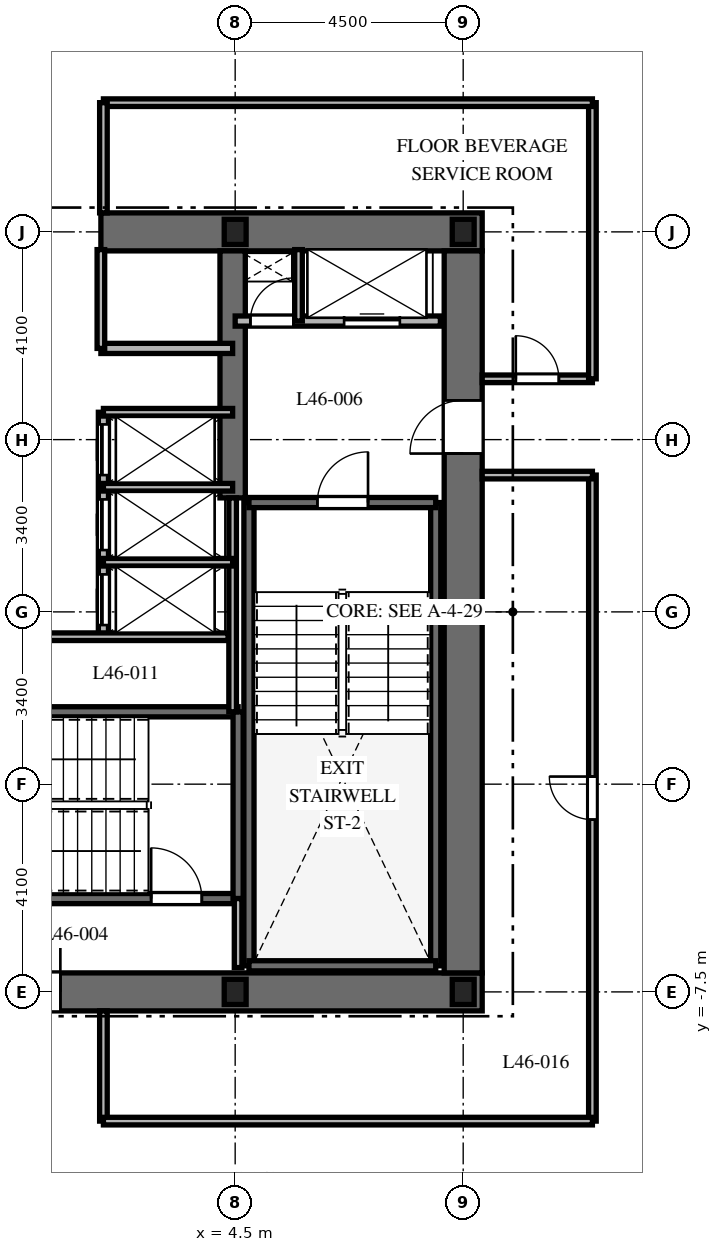
"""IFC4 building model, lengths in metres.
Left out: names, types, materials, properties, quantities, classifications, styles, units other than length and angle.
Written with IfcOpenShell. Run it as: python <this file> out.ifc"""

import sys

from ifc_helpers import new_model, si_unit, direction, frame, frame_2d, origin, origin_2d, place, context, subcontext, project, spatial, rectangle, i_section, extrude, element, fill, save


model = new_model("IFC4")
c1 = context("Model", 3, precision=1e-05, world=origin(), true_north=direction((0.0, 1.0)))
c2 = subcontext(c1, "Body", "Model", "MODEL_VIEW")
j1 = project(units=[si_unit("LENGTHUNIT", "METRE"), si_unit("PLANEANGLEUNIT", "RADIAN")], contexts=[c1])
p1 = place(None, origin())
s1 = spatial("IfcSite", under=j1, at=p1, CompositionType="ELEMENT")
p2 = place(p1, origin())
s2 = spatial("IfcBuilding", under=s1, at=p2, CompositionType="ELEMENT")
p3 = place(p2, frame((0.0, 0.0, 186.7)))
s3 = spatial("IfcBuildingStorey", under=s2, at=p3, CompositionType="ELEMENT", Elevation=186.7)
p4 = place(p3, frame((-9.375, -7.5, 0.0), z_axis=(0.0, 0.0, 1.0), x_axis=(1.0, 0.0, 0.0)))
e1 = element("IfcWall", 1, at=p4, inside=s3, PredefinedType="SHEAR", context=c2, shape_type="SweptSolid", body=[
    extrude(rectangle(XDim=18.75, YDim=0.75, at=frame_2d((9.375, 0.0))), origin(), (0.0, 0.0, 1.0), 3.7),
])
p5 = place(p4, frame((9.425, 0.0, 0.0)))
e2 = element("IfcOpeningElement", 2, at=p5, cuts=e1, PredefinedType="OPENING", context=c2, shape_type="SweptSolid", body=[
    extrude(rectangle(XDim=1.0, YDim=2.15, at=frame_2d((0.5, 1.075))), frame((0.0, 0.385, 0.0), z_axis=(0.0, -1.0, 0.0), x_axis=(1.0, 0.0, 0.0)), (0.0, 0.0, 1.0), 0.77),
])
p6 = place(p3, frame((1.85, 7.5, 0.0), z_axis=(0.0, 0.0, 1.0), x_axis=(1.0, 0.0, 0.0)))
e3 = element("IfcWall", 3, at=p6, inside=s3, PredefinedType="SHEAR", context=c2, shape_type="SweptSolid", body=[
    extrude(rectangle(XDim=7.525, YDim=0.75, at=frame_2d((3.762, 0.0))), origin(), (0.0, 0.0, 1.0), 3.7),
])
p7 = place(p3, frame((9.0, -7.125, 0.0), z_axis=(0.0, 0.0, 1.0), x_axis=(0.0, 1.0, 0.0)))
e4 = element("IfcWall", 4, at=p7, inside=s3, PredefinedType="SHEAR", context=c2, shape_type="SweptSolid", body=[
    extrude(rectangle(XDim=14.25, YDim=0.75, at=frame_2d((7.125, 0.0))), origin(), (0.0, 0.0, 1.0), 3.7),
])
p8 = place(p7, frame((10.25, 0.0, 0.0)))
e5 = element("IfcOpeningElement", 5, at=p8, cuts=e4, PredefinedType="OPENING", context=c2, shape_type="SweptSolid", body=[
    extrude(rectangle(XDim=1.05, YDim=2.15, at=frame_2d((0.525, 1.075))), frame((0.0, 0.385, 0.0), z_axis=(0.0, -1.0, 0.0), x_axis=(1.0, 0.0, 0.0)), (0.0, 0.0, 1.0), 0.77),
])
p9 = place(p3, frame((4.45, 2.25, 0.0), z_axis=(0.0, 0.0, 1.0), x_axis=(0.0, 1.0, 0.0)))
e6 = element("IfcWall", 6, at=p9, inside=s3, PredefinedType="SHEAR", context=c2, shape_type="SweptSolid", body=[
    extrude(rectangle(XDim=4.875, YDim=0.5, at=frame_2d((2.438, 0.0))), origin(), (0.0, 0.0, 1.0), 3.7),
])
for number, where, z_axis, x_axis in (
    (7, (4.772, -6.985, 0.0), (0.0, 0.0, 1.0), (0.0, 1.0, 0.0)),
    (8, (8.458, -6.985, 0.0), (0.0, 0.0, 1.0), (0.0, 1.0, 0.0)),
):
    element("IfcWall", number, at=place(p3, frame(where, z_axis=z_axis, x_axis=x_axis)), inside=s3, PredefinedType="SHEAR", context=c2, shape_type="SweptSolid", body=[
        extrude(rectangle(XDim=9.143, YDim=0.2, at=frame_2d((4.572, 0.0))), origin(), (0.0, 0.0, 1.0), 3.7),
    ])
p10 = place(p3, frame((4.772, -6.985, 0.0), z_axis=(0.0, 0.0, 1.0), x_axis=(1.0, 0.0, 0.0)))
e9 = element("IfcWall", 9, at=p10, inside=s3, PredefinedType="SHEAR", context=c2, shape_type="SweptSolid", body=[
    extrude(rectangle(XDim=3.686, YDim=0.2, at=frame_2d((1.843, 0.0))), origin(), (0.0, 0.0, 1.0), 3.7),
])
p11 = place(p3, frame((4.772, 2.158, 0.0), z_axis=(0.0, 0.0, 1.0), x_axis=(1.0, 0.0, 0.0)))
e10 = element("IfcWall", 10, at=p11, inside=s3, PredefinedType="SHEAR", context=c2, shape_type="SweptSolid", body=[
    extrude(rectangle(XDim=3.686, YDim=0.2, at=frame_2d((1.843, 0.0))), origin(), (0.0, 0.0, 1.0), 3.7),
])
p12 = place(p11, frame((1.35, 0.0, 0.0)))
e11 = element("IfcOpeningElement", 11, at=p12, cuts=e10, PredefinedType="OPENING", context=c2, shape_type="SweptSolid", body=[
    extrude(rectangle(XDim=1.0, YDim=2.15, at=frame_2d((0.5, 1.075))), frame((0.0, 0.11, 0.0), z_axis=(0.0, -1.0, 0.0), x_axis=(1.0, 0.0, 0.0)), (0.0, 0.0, 1.0), 0.22),
])
p13 = place(p3, frame((-4.608, -5.658, 0.0), z_axis=(0.0, 0.0, 1.0), x_axis=(1.0, 0.0, 0.0)))
e12 = element("IfcWall", 12, at=p13, inside=s3, PredefinedType="SHEAR", context=c2, shape_type="SweptSolid", body=[
    extrude(rectangle(XDim=9.166, YDim=0.2, at=frame_2d((4.583, 0.0))), origin(), (0.0, 0.0, 1.0), 3.7),
])
p14 = place(p13, frame((7.45, 0.0, 0.0)))
e13 = element("IfcOpeningElement", 13, at=p14, cuts=e12, PredefinedType="OPENING", context=c2, shape_type="SweptSolid", body=[
    extrude(rectangle(XDim=1.0, YDim=2.15, at=frame_2d((0.5, 1.075))), frame((0.0, 0.11, 0.0), z_axis=(0.0, -1.0, 0.0), x_axis=(1.0, 0.0, 0.0)), (0.0, 0.0, 1.0), 0.22),
])
p15 = place(p3, frame((-4.608, -1.972, 0.0), z_axis=(0.0, 0.0, 1.0), x_axis=(1.0, 0.0, 0.0)))
e14 = element("IfcWall", 14, at=p15, inside=s3, PredefinedType="SHEAR", context=c2, shape_type="SweptSolid", body=[
    extrude(rectangle(XDim=9.166, YDim=0.2, at=frame_2d((4.583, 0.0))), origin(), (0.0, 0.0, 1.0), 3.7),
])
p16 = place(p3, frame((4.558, -5.658, 0.0), z_axis=(0.0, 0.0, 1.0), x_axis=(0.0, 1.0, 0.0)))
e15 = element("IfcWall", 15, at=p16, inside=s3, PredefinedType="SHEAR", context=c2, shape_type="SweptSolid", body=[
    extrude(rectangle(XDim=3.686, YDim=0.2, at=frame_2d((1.843, 0.0))), origin(), (0.0, 0.0, 1.0), 3.7),
])
for number, where, z_axis, x_axis in (
    (16, (4.5, -7.5, 0.0), (0.0, 0.0, 1.0), (1.0, 0.0, 0.0)),
    (17, (9.0, -7.5, 0.0), (0.0, 0.0, 1.0), (1.0, 0.0, 0.0)),
    (18, (9.0, 7.5, 0.0), (0.0, 0.0, 1.0), (1.0, 0.0, 0.0)),
    (19, (4.5, 7.5, 0.0), (0.0, 0.0, 1.0), (1.0, 0.0, 0.0)),
):
    element("IfcColumn", number, at=place(p3, frame(where, z_axis=z_axis, x_axis=x_axis)), inside=s3, PredefinedType="COLUMN", context=c2, shape_type="SweptSolid", body=[
        extrude(i_section(OverallWidth=0.432, OverallDepth=0.498, WebThickness=0.056, FlangeThickness=0.089, at=origin_2d()), origin(), (0.0, 0.0, 1.0), 3.7),
    ])
p17 = place(p3, frame((4.558, -7.02, 0.0), z_axis=(0.0, 0.0, 1.0), x_axis=(0.0, 1.0, 0.0)))
e20 = element("IfcWall", 20, at=p17, inside=s3, PredefinedType="PARTITIONING", context=c2, shape_type="SweptSolid", body=[
    extrude(rectangle(XDim=1.362, YDim=0.15, at=frame_2d((0.681, 0.0))), origin(), (0.0, 0.0, 1.0), 3.4),
])
p18 = place(p3, frame((4.5, 5.74, 0.0), z_axis=(0.0, 0.0, 1.0), x_axis=(1.0, 0.0, 0.0)))
e21 = element("IfcWall", 21, at=p18, inside=s3, PredefinedType="PARTITIONING", context=c2, shape_type="SweptSolid", body=[
    extrude(rectangle(XDim=4.05, YDim=0.2, at=frame_2d((2.025, 0.0))), origin(), (0.0, 0.0, 1.0), 3.4),
])
p19 = place(p18, frame((0.3, 0.0, 0.0)))
e22 = element("IfcOpeningElement", 22, at=p19, cuts=e21, PredefinedType="OPENING", context=c2, shape_type="SweptSolid", body=[
    extrude(rectangle(XDim=0.85, YDim=2.03, at=frame_2d((0.425, 1.015))), frame((0.0, 0.11, 0.0), z_axis=(0.0, -1.0, 0.0), x_axis=(1.0, 0.0, 0.0)), (0.0, 0.0, 1.0), 0.22),
])
p20 = place(p18, frame((2.15, 0.0, 0.0)))
e23 = element("IfcOpeningElement", 23, at=p20, cuts=e21, PredefinedType="OPENING", context=c2, shape_type="SweptSolid", body=[
    extrude(rectangle(XDim=1.1, YDim=2.2, at=frame_2d((0.55, 1.1))), frame((0.0, 0.11, 0.0), z_axis=(0.0, -1.0, 0.0), x_axis=(1.0, 0.0, 0.0)), (0.0, 0.0, 1.0), 0.22),
])
p21 = place(p3, frame((5.75, 5.74, 0.0), z_axis=(0.0, 0.0, 1.0), x_axis=(0.0, 1.0, 0.0)))
e24 = element("IfcWall", 24, at=p21, inside=s3, PredefinedType="PARTITIONING", context=c2, shape_type="SweptSolid", body=[
    extrude(rectangle(XDim=1.41, YDim=0.15, at=frame_2d((0.705, 0.0))), origin(), (0.0, 0.0, 1.0), 3.4),
])
p22 = place(p3, frame((1.85, 5.2, 0.0), z_axis=(0.0, 0.0, 1.0), x_axis=(1.0, 0.0, 0.0)))
e25 = element("IfcWall", 25, at=p22, inside=s3, PredefinedType="PARTITIONING", context=c2, shape_type="SweptSolid", body=[
    extrude(rectangle(XDim=2.6, YDim=0.2, at=frame_2d((1.3, 0.0))), origin(), (0.0, 0.0, 1.0), 3.4),
])
p23 = place(p3, frame((1.85, 5.2, 0.0), z_axis=(0.0, 0.0, 1.0), x_axis=(0.0, 1.0, 0.0)))
e26 = element("IfcWall", 26, at=p23, inside=s3, PredefinedType="PARTITIONING", context=c2, shape_type="SweptSolid", body=[
    extrude(rectangle(XDim=1.95, YDim=0.15, at=frame_2d((0.975, 0.0))), origin(), (0.0, 0.0, 1.0), 3.4),
])
p24 = place(p3, frame((4.45, -1.972, 0.0), z_axis=(0.0, 0.0, 1.0), x_axis=(0.0, 1.0, 0.0)))
e27 = element("IfcWall", 27, at=p24, inside=s3, PredefinedType="PARTITIONING", context=c2, shape_type="SweptSolid", body=[
    extrude(rectangle(XDim=4.222, YDim=0.15, at=frame_2d((2.111, 0.0))), origin(), (0.0, 0.0, 1.0), 3.4),
])
p25 = place(p3, frame((1.9, -0.5, 0.0), z_axis=(0.0, 0.0, 1.0), x_axis=(0.0, 1.0, 0.0)))
e28 = element("IfcWall", 28, at=p25, inside=s3, PredefinedType="PARTITIONING", context=c2, shape_type="SweptSolid", body=[
    extrude(rectangle(XDim=4.44, YDim=0.2, at=frame_2d((2.22, 0.0))), origin(), (0.0, 0.0, 1.0), 3.4),
])
p26 = place(p25, frame((0.24, 0.0, 0.0)))
e29 = element("IfcOpeningElement", 29, at=p26, cuts=e28, PredefinedType="OPENING", context=c2, shape_type="SweptSolid", body=[
    extrude(rectangle(XDim=1.0, YDim=2.2, at=frame_2d((0.5, 1.1))), frame((0.0, 0.11, 0.0), z_axis=(0.0, -1.0, 0.0), x_axis=(1.0, 0.0, 0.0)), (0.0, 0.0, 1.0), 0.22),
])
p27 = place(p25, frame((1.72, 0.0, 0.0)))
e30 = element("IfcOpeningElement", 30, at=p27, cuts=e28, PredefinedType="OPENING", context=c2, shape_type="SweptSolid", body=[
    extrude(rectangle(XDim=1.0, YDim=2.2, at=frame_2d((0.5, 1.1))), frame((0.0, 0.11, 0.0), z_axis=(0.0, -1.0, 0.0), x_axis=(1.0, 0.0, 0.0)), (0.0, 0.0, 1.0), 0.22),
])
p28 = place(p25, frame((3.2, 0.0, 0.0)))
e31 = element("IfcOpeningElement", 31, at=p28, cuts=e28, PredefinedType="OPENING", context=c2, shape_type="SweptSolid", body=[
    extrude(rectangle(XDim=1.0, YDim=2.2, at=frame_2d((0.5, 1.1))), frame((0.0, 0.11, 0.0), z_axis=(0.0, -1.0, 0.0), x_axis=(1.0, 0.0, 0.0)), (0.0, 0.0, 1.0), 0.22),
])
for number, where, z_axis, x_axis in (
    (32, (1.9, 3.94, 0.0), (0.0, 0.0, 1.0), (1.0, 0.0, 0.0)),
    (33, (1.9, 0.98, 0.0), (0.0, 0.0, 1.0), (1.0, 0.0, 0.0)),
    (34, (1.9, 2.46, 0.0), (0.0, 0.0, 1.0), (1.0, 0.0, 0.0)),
):
    element("IfcWall", number, at=place(p3, frame(where, z_axis=z_axis, x_axis=x_axis)), inside=s3, PredefinedType="PARTITIONING", context=c2, shape_type="SweptSolid", body=[
        extrude(rectangle(XDim=2.55, YDim=0.15, at=frame_2d((1.275, 0.0))), origin(), (0.0, 0.0, 1.0), 3.4),
    ])
p29 = place(p3, frame((-4.36, -0.49, 0.0), z_axis=(0.0, 0.0, 1.0), x_axis=(1.0, 0.0, 0.0)))
e35 = element("IfcWall", 35, at=p29, inside=s3, PredefinedType="PARTITIONING", context=c2, shape_type="SweptSolid", body=[
    extrude(rectangle(XDim=8.72, YDim=0.15, at=frame_2d((4.36, 0.0))), origin(), (0.0, 0.0, 1.0), 3.4),
])
p30 = place(p29, frame((3.86, 0.0, 0.0)))
e36 = element("IfcOpeningElement", 36, at=p30, cuts=e35, PredefinedType="OPENING", context=c2, shape_type="SweptSolid", body=[
    extrude(rectangle(XDim=0.9, YDim=2.03, at=frame_2d((0.45, 1.015))), frame((0.0, 0.085, 0.0), z_axis=(0.0, -1.0, 0.0), x_axis=(1.0, 0.0, 0.0)), (0.0, 0.0, 1.0), 0.17),
])
p31 = place(p3, frame((11.55, -10.05, 0.0), z_axis=(0.0, 0.0, 1.0), x_axis=(0.0, 1.0, 0.0)))
e37 = element("IfcWall", 37, at=p31, inside=s3, PredefinedType="PARTITIONING", context=c2, shape_type="SweptSolid", body=[
    extrude(rectangle(XDim=12.75, YDim=0.15, at=frame_2d((6.375, 0.0))), origin(), (0.0, 0.0, 1.0), 2.84),
])
p32 = place(p31, frame((5.95, 0.0, 0.0)))
e38 = element("IfcOpeningElement", 38, at=p32, cuts=e37, PredefinedType="OPENING", context=c2, shape_type="SweptSolid", body=[
    extrude(rectangle(XDim=0.85, YDim=2.03, at=frame_2d((0.425, 1.015))), frame((0.0, 0.085, 0.0), z_axis=(0.0, -1.0, 0.0), x_axis=(1.0, 0.0, 0.0)), (0.0, 0.0, 1.0), 0.17),
])
p33 = place(p3, frame((11.55, 2.7, 0.0), z_axis=(0.0, 0.0, 1.0), x_axis=(-1.0, 0.0, 0.0)))
e39 = element("IfcWall", 39, at=p33, inside=s3, PredefinedType="PARTITIONING", context=c2, shape_type="SweptSolid", body=[
    extrude(rectangle(XDim=2.175, YDim=0.15, at=frame_2d((1.087, 0.0))), origin(), (0.0, 0.0, 1.0), 3.4),
])
p34 = place(p3, frame((9.375, 4.6, 0.0), z_axis=(0.0, 0.0, 1.0), x_axis=(1.0, 0.0, 0.0)))
e40 = element("IfcWall", 40, at=p34, inside=s3, PredefinedType="PARTITIONING", context=c2, shape_type="SweptSolid", body=[
    extrude(rectangle(XDim=2.175, YDim=0.15, at=frame_2d((1.087, 0.0))), origin(), (0.0, 0.0, 1.0), 3.4),
])
p35 = place(p34, frame((0.663, 0.0, 0.0)))
e41 = element("IfcOpeningElement", 41, at=p35, cuts=e40, PredefinedType="OPENING", context=c2, shape_type="SweptSolid", body=[
    extrude(rectangle(XDim=0.85, YDim=2.03, at=frame_2d((0.425, 1.015))), frame((0.0, 0.085, 0.0), z_axis=(0.0, -1.0, 0.0), x_axis=(1.0, 0.0, 0.0)), (0.0, 0.0, 1.0), 0.17),
])
p36 = place(p3, frame((11.55, 4.6, 0.0), z_axis=(0.0, 0.0, 1.0), x_axis=(0.0, 1.0, 0.0)))
e42 = element("IfcWall", 42, at=p36, inside=s3, PredefinedType="PARTITIONING", context=c2, shape_type="SweptSolid", body=[
    extrude(rectangle(XDim=5.45, YDim=0.15, at=frame_2d((2.725, 0.0))), origin(), (0.0, 0.0, 1.0), 2.84),
])
p37 = place(p3, frame((11.55, 10.05, 0.0), z_axis=(0.0, 0.0, 1.0), x_axis=(-1.0, 0.0, 0.0)))
e43 = element("IfcWall", 43, at=p37, inside=s3, PredefinedType="PARTITIONING", context=c2, shape_type="SweptSolid", body=[
    extrude(rectangle(XDim=9.65, YDim=0.15, at=frame_2d((4.825, 0.0))), origin(), (0.0, 0.0, 1.0), 2.84),
])
for number, where, z_axis, x_axis in (
    (44, (1.9, 10.05, 0.0), (0.0, 0.0, 1.0), (0.0, -1.0, 0.0)),
    (45, (1.9, -7.875, 0.0), (0.0, 0.0, 1.0), (0.0, -1.0, 0.0)),
):
    element("IfcWall", number, at=place(p3, frame(where, z_axis=z_axis, x_axis=x_axis)), inside=s3, PredefinedType="PARTITIONING", context=c2, shape_type="SweptSolid", body=[
        extrude(rectangle(XDim=2.175, YDim=0.15, at=frame_2d((1.087, 0.0))), origin(), (0.0, 0.0, 1.0), 3.4),
    ])
p38 = place(p3, frame((1.9, -10.05, 0.0), z_axis=(0.0, 0.0, 1.0), x_axis=(1.0, 0.0, 0.0)))
e46 = element("IfcWall", 46, at=p38, inside=s3, PredefinedType="PARTITIONING", context=c2, shape_type="SweptSolid", body=[
    extrude(rectangle(XDim=9.65, YDim=0.15, at=frame_2d((4.825, 0.0))), origin(), (0.0, 0.0, 1.0), 2.84),
])
p39 = place(p12, origin())
e47 = element("IfcDoor", 47, at=p39, inside=s3, OperationType="SINGLE_SWING_RIGHT", PredefinedType="DOOR", context=c2, shape_type="SweptSolid", body=[
    extrude(rectangle(XDim=1.0, YDim=2.15, at=frame_2d((0.5, 1.075))), frame((0.0, 0.025, 0.0), z_axis=(0.0, -1.0, 0.0), x_axis=(1.0, 0.0, 0.0)), (0.0, 0.0, 1.0), 0.05),
])
fill(e11, e47)
p40 = place(p14, origin())
e48 = element("IfcDoor", 48, at=p40, inside=s3, OperationType="SINGLE_SWING_LEFT", PredefinedType="DOOR", context=c2, shape_type="SweptSolid", body=[
    extrude(rectangle(XDim=1.0, YDim=2.15, at=frame_2d((0.5, 1.075))), frame((0.0, 0.025, 0.0), z_axis=(0.0, -1.0, 0.0), x_axis=(1.0, 0.0, 0.0)), (0.0, 0.0, 1.0), 0.05),
])
fill(e13, e48)
p41 = place(p5, origin())
e49 = element("IfcDoor", 49, at=p41, inside=s3, OperationType="SINGLE_SWING_RIGHT", PredefinedType="DOOR", context=c2, shape_type="SweptSolid", body=[
    extrude(rectangle(XDim=1.0, YDim=2.15, at=frame_2d((0.5, 1.075))), frame((0.0, 0.025, 0.0), z_axis=(0.0, -1.0, 0.0), x_axis=(1.0, 0.0, 0.0)), (0.0, 0.0, 1.0), 0.05),
])
fill(e2, e49)
p42 = place(p8, origin())
e50 = element("IfcDoor", 50, at=p42, inside=s3, OperationType="SINGLE_SWING_LEFT", PredefinedType="DOOR", context=c2, shape_type="SweptSolid", body=[
    extrude(rectangle(XDim=1.05, YDim=2.15, at=frame_2d((0.525, 1.075))), frame((0.0, 0.025, 0.0), z_axis=(0.0, -1.0, 0.0), x_axis=(1.0, 0.0, 0.0)), (0.0, 0.0, 1.0), 0.05),
])
fill(e5, e50)
p43 = place(p19, origin())
e51 = element("IfcDoor", 51, at=p43, inside=s3, OperationType="SINGLE_SWING_RIGHT", PredefinedType="DOOR", context=c2, shape_type="SweptSolid", body=[
    extrude(rectangle(XDim=0.85, YDim=2.03, at=frame_2d((0.425, 1.015))), frame((0.0, 0.025, 0.0), z_axis=(0.0, -1.0, 0.0), x_axis=(1.0, 0.0, 0.0)), (0.0, 0.0, 1.0), 0.05),
])
fill(e22, e51)
p44 = place(p20, origin())
e52 = element("IfcDoor", 52, at=p44, inside=s3, OperationType="SLIDING_TO_RIGHT", PredefinedType="DOOR", context=c2, shape_type="SweptSolid", body=[
    extrude(rectangle(XDim=1.1, YDim=2.2, at=frame_2d((0.55, 1.1))), frame((0.0, 0.025, 0.0), z_axis=(0.0, -1.0, 0.0), x_axis=(1.0, 0.0, 0.0)), (0.0, 0.0, 1.0), 0.05),
])
fill(e23, e52)
p45 = place(p26, origin())
e53 = element("IfcDoor", 53, at=p45, inside=s3, OperationType="SLIDING_TO_RIGHT", PredefinedType="DOOR", context=c2, shape_type="SweptSolid", body=[
    extrude(rectangle(XDim=1.0, YDim=2.2, at=frame_2d((0.5, 1.1))), frame((0.0, 0.025, 0.0), z_axis=(0.0, -1.0, 0.0), x_axis=(1.0, 0.0, 0.0)), (0.0, 0.0, 1.0), 0.05),
])
fill(e29, e53)
p46 = place(p27, origin())
e54 = element("IfcDoor", 54, at=p46, inside=s3, OperationType="SLIDING_TO_RIGHT", PredefinedType="DOOR", context=c2, shape_type="SweptSolid", body=[
    extrude(rectangle(XDim=1.0, YDim=2.2, at=frame_2d((0.5, 1.1))), frame((0.0, 0.025, 0.0), z_axis=(0.0, -1.0, 0.0), x_axis=(1.0, 0.0, 0.0)), (0.0, 0.0, 1.0), 0.05),
])
fill(e30, e54)
p47 = place(p28, origin())
e55 = element("IfcDoor", 55, at=p47, inside=s3, OperationType="SLIDING_TO_RIGHT", PredefinedType="DOOR", context=c2, shape_type="SweptSolid", body=[
    extrude(rectangle(XDim=1.0, YDim=2.2, at=frame_2d((0.5, 1.1))), frame((0.0, 0.025, 0.0), z_axis=(0.0, -1.0, 0.0), x_axis=(1.0, 0.0, 0.0)), (0.0, 0.0, 1.0), 0.05),
])
fill(e31, e55)
p48 = place(p35, origin())
e56 = element("IfcDoor", 56, at=p48, inside=s3, OperationType="SINGLE_SWING_LEFT", PredefinedType="DOOR", context=c2, shape_type="SweptSolid", body=[
    extrude(rectangle(XDim=0.85, YDim=2.03, at=frame_2d((0.425, 1.015))), frame((0.0, 0.025, 0.0), z_axis=(0.0, -1.0, 0.0), x_axis=(1.0, 0.0, 0.0)), (0.0, 0.0, 1.0), 0.05),
])
fill(e41, e56)
p49 = place(p32, origin())
e57 = element("IfcDoor", 57, at=p49, inside=s3, OperationType="SINGLE_SWING_RIGHT", PredefinedType="DOOR", context=c2, shape_type="SweptSolid", body=[
    extrude(rectangle(XDim=0.85, YDim=2.03, at=frame_2d((0.425, 1.015))), frame((0.0, 0.025, 0.0), z_axis=(0.0, -1.0, 0.0), x_axis=(1.0, 0.0, 0.0)), (0.0, 0.0, 1.0), 0.05),
])
fill(e38, e57)
save(model, sys.argv[1])
